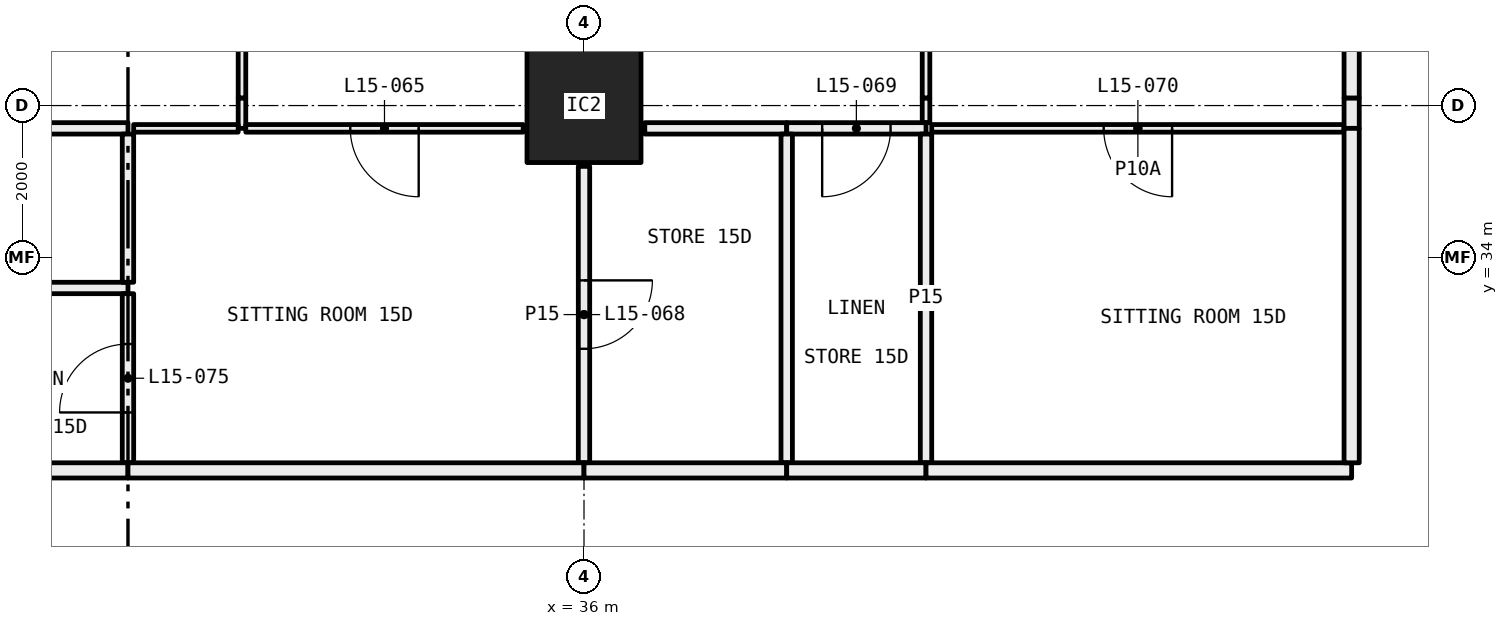
"""IFC4 building model, lengths in metres.
Left out: names, types, materials, properties, quantities, classifications, styles, units other than length and angle.
Written with IfcOpenShell. Run it as: python <this file> out.ifc"""

import sys

from ifc_helpers import new_model, si_unit, direction, frame, frame_2d, origin, origin_2d, place, context, subcontext, project, spatial, rectangle, hollow_rectangle, extrude, element, fill, save


model = new_model("IFC4")
c1 = context("Model", 3, precision=1e-05, world=origin(), true_north=direction((0.0, 1.0)))
c2 = subcontext(c1, "Body", "Model", "MODEL_VIEW")
j1 = project(units=[si_unit("LENGTHUNIT", "METRE"), si_unit("PLANEANGLEUNIT", "RADIAN")], contexts=[c1])
p1 = place(None, origin())
s1 = spatial("IfcSite", under=j1, at=p1, CompositionType="ELEMENT")
p2 = place(p1, origin())
s2 = spatial("IfcBuilding", under=s1, at=p2, CompositionType="ELEMENT")
p3 = place(p2, frame((0.0, 0.0, 64.5)))
s3 = spatial("IfcBuildingStorey", under=s2, at=p3, CompositionType="ELEMENT", Elevation=64.5)
p4 = place(p3, frame((36.0, 36.0, 0.0), z_axis=(0.0, 0.0, 1.0), x_axis=(1.0, 0.0, 0.0)))
e1 = element("IfcColumn", 1, at=p4, inside=s3, PredefinedType="COLUMN", context=c2, shape_type="SweptSolid", body=[
    extrude(hollow_rectangle(XDim=1.5, YDim=1.5, WallThickness=0.065, at=origin_2d()), origin(), (0.0, 0.0, 1.0), 3.05),
])
p5 = place(p3, frame((31.5, 35.7, 0.0), z_axis=(0.0, 0.0, 1.0), x_axis=(0.0, 1.0, 0.0)))
e2 = element("IfcWall", 2, at=p5, inside=s3, PredefinedType="PARTITIONING", context=c2, shape_type="SweptSolid", body=[
    extrude(rectangle(XDim=0.4, YDim=0.1, at=frame_2d((0.2, 0.0))), origin(), (0.0, 0.0, 1.0), 2.45),
])
p6 = place(p3, frame((31.5, 36.1, 0.0), z_axis=(0.0, 0.0, 1.0), x_axis=(0.0, 1.0, 0.0)))
e3 = element("IfcWall", 3, at=p6, inside=s3, PredefinedType="PARTITIONING", context=c2, shape_type="SweptSolid", body=[
    extrude(rectangle(XDim=5.825, YDim=0.1, at=frame_2d((2.913, 0.0))), origin(), (0.0, 0.0, 1.0), 3.05),
])
p7 = place(p6, frame((2.462, 0.0, 0.0)))
e4 = element("IfcOpeningElement", 4, at=p7, cuts=e3, PredefinedType="OPENING", context=c2, shape_type="SweptSolid", body=[
    extrude(rectangle(XDim=0.9, YDim=2.1, at=frame_2d((0.45, 1.05))), frame((0.0, 0.06, 0.0), z_axis=(0.0, -1.0, 0.0), x_axis=(1.0, 0.0, 0.0)), (0.0, 0.0, 1.0), 0.12),
])
p8 = place(p3, frame((26.0, 35.7, 0.0), z_axis=(0.0, 0.0, 1.0), x_axis=(1.0, 0.0, 0.0)))
e5 = element("IfcWall", 5, at=p8, inside=s3, PredefinedType="PARTITIONING", context=c2, shape_type="SweptSolid", body=[
    extrude(rectangle(XDim=4.0, YDim=0.15, at=frame_2d((2.0, 0.0))), origin(), (0.0, 0.0, 1.0), 3.05),
])
p9 = place(p8, frame((1.55, 0.0, 0.0)))
e6 = element("IfcOpeningElement", 6, at=p9, cuts=e5, PredefinedType="OPENING", context=c2, shape_type="SweptSolid", body=[
    extrude(rectangle(XDim=0.9, YDim=2.1, at=frame_2d((0.45, 1.05))), frame((0.0, 0.085, 0.0), z_axis=(0.0, -1.0, 0.0), x_axis=(1.0, 0.0, 0.0)), (0.0, 0.0, 1.0), 0.17),
])
p10 = place(p3, frame((30.075, 35.7, 0.0), z_axis=(0.0, 0.0, 1.0), x_axis=(1.0, 0.0, 0.0)))
e7 = element("IfcWall", 7, at=p10, inside=s3, PredefinedType="PARTITIONING", context=c2, shape_type="SweptSolid", body=[
    extrude(rectangle(XDim=1.375, YDim=0.1, at=frame_2d((0.688, 0.0))), origin(), (0.0, 0.0, 1.0), 3.05),
])
p11 = place(p3, frame((31.55, 35.7, 0.0), z_axis=(0.0, 0.0, 1.0), x_axis=(1.0, 0.0, 0.0)))
e8 = element("IfcWall", 8, at=p11, inside=s3, PredefinedType="PARTITIONING", context=c2, shape_type="SweptSolid", body=[
    extrude(rectangle(XDim=3.65, YDim=0.1, at=frame_2d((1.825, 0.0))), origin(), (0.0, 0.0, 1.0), 3.05),
])
p12 = place(p11, frame((1.375, 0.0, 0.0)))
e9 = element("IfcOpeningElement", 9, at=p12, cuts=e8, PredefinedType="OPENING", context=c2, shape_type="SweptSolid", body=[
    extrude(rectangle(XDim=0.9, YDim=2.1, at=frame_2d((0.45, 1.05))), frame((0.0, 0.06, 0.0), z_axis=(0.0, -1.0, 0.0), x_axis=(1.0, 0.0, 0.0)), (0.0, 0.0, 1.0), 0.12),
])
p13 = place(p3, frame((30.0, 33.6, 0.0), z_axis=(0.0, 0.0, 1.0), x_axis=(-1.0, 0.0, 0.0)))
e10 = element("IfcWall", 10, at=p13, inside=s3, PredefinedType="PARTITIONING", context=c2, shape_type="SweptSolid", body=[
    extrude(rectangle(XDim=1.775, YDim=0.15, at=frame_2d((0.887, 0.0))), origin(), (0.0, 0.0, 1.0), 3.05),
])
p14 = place(p3, frame((30.0, 31.3, 0.0), z_axis=(0.0, 0.0, 1.0), x_axis=(0.0, 1.0, 0.0)))
e11 = element("IfcWall", 11, at=p14, inside=s3, PredefinedType="PARTITIONING", context=c2, shape_type="SweptSolid", body=[
    extrude(rectangle(XDim=2.225, YDim=0.15, at=frame_2d((1.112, 0.0))), origin(), (0.0, 0.0, 1.0), 3.05),
])
p15 = place(p14, frame((0.663, 0.0, 0.0)))
e12 = element("IfcOpeningElement", 12, at=p15, cuts=e11, PredefinedType="OPENING", context=c2, shape_type="SweptSolid", body=[
    extrude(rectangle(XDim=0.9, YDim=2.1, at=frame_2d((0.45, 1.05))), frame((0.0, 0.085, 0.0), z_axis=(0.0, -1.0, 0.0), x_axis=(1.0, 0.0, 0.0)), (0.0, 0.0, 1.0), 0.17),
])
p16 = place(p3, frame((28.15, 31.2, 0.0), z_axis=(0.0, 0.0, 1.0), x_axis=(1.0, 0.0, 0.0)))
e13 = element("IfcWall", 13, at=p16, inside=s3, PredefinedType="PARTITIONING", context=c2, shape_type="SweptSolid", body=[
    extrude(rectangle(XDim=1.85, YDim=0.2, at=frame_2d((0.925, 0.0))), origin(), (0.0, 0.0, 1.0), 3.05),
])
p17 = place(p3, frame((30.0, 33.675, 0.0), z_axis=(0.0, 0.0, 1.0), x_axis=(0.0, 1.0, 0.0)))
e14 = element("IfcWall", 14, at=p17, inside=s3, PredefinedType="PARTITIONING", context=c2, shape_type="SweptSolid", body=[
    extrude(rectangle(XDim=1.95, YDim=0.15, at=frame_2d((0.975, 0.0))), origin(), (0.0, 0.0, 1.0), 3.05),
])
p18 = place(p3, frame((36.0, 31.3, 0.0), z_axis=(0.0, 0.0, 1.0), x_axis=(0.0, 1.0, 0.0)))
e15 = element("IfcWall", 15, at=p18, inside=s3, PredefinedType="PARTITIONING", context=c2, shape_type="SweptSolid", body=[
    extrude(rectangle(XDim=3.9, YDim=0.15, at=frame_2d((1.95, 0.0))), origin(), (0.0, 0.0, 1.0), 2.45),
])
p19 = place(p18, frame((1.5, 0.0, 0.0)))
e16 = element("IfcOpeningElement", 16, at=p19, cuts=e15, PredefinedType="OPENING", context=c2, shape_type="SweptSolid", body=[
    extrude(rectangle(XDim=0.9, YDim=2.1, at=frame_2d((0.45, 1.05))), frame((0.0, 0.085, 0.0), z_axis=(0.0, -1.0, 0.0), x_axis=(1.0, 0.0, 0.0)), (0.0, 0.0, 1.0), 0.17),
])
p20 = place(p3, frame((30.0, 31.2, 0.0), z_axis=(0.0, 0.0, 1.0), x_axis=(1.0, 0.0, 0.0)))
e17 = element("IfcWall", 17, at=p20, inside=s3, PredefinedType="PARTITIONING", context=c2, shape_type="SweptSolid", body=[
    extrude(rectangle(XDim=6.0, YDim=0.2, at=frame_2d((3.0, 0.0))), origin(), (0.0, 0.0, 1.0), 2.45),
])
p21 = place(p3, frame((40.5, 35.775, 0.0), z_axis=(0.0, 0.0, 1.0), x_axis=(0.0, 1.0, 0.0)))
e18 = element("IfcWall", 18, at=p21, inside=s3, PredefinedType="PARTITIONING", context=c2, shape_type="SweptSolid", body=[
    extrude(rectangle(XDim=0.325, YDim=0.1, at=frame_2d((0.163, 0.0))), origin(), (0.0, 0.0, 1.0), 2.45),
])
p22 = place(p3, frame((40.5, 36.1, 0.0), z_axis=(0.0, 0.0, 1.0), x_axis=(0.0, 1.0, 0.0)))
e19 = element("IfcWall", 19, at=p22, inside=s3, PredefinedType="PARTITIONING", context=c2, shape_type="SweptSolid", body=[
    extrude(rectangle(XDim=5.85, YDim=0.1, at=frame_2d((2.925, 0.0))), origin(), (0.0, 0.0, 1.0), 3.05),
])
p23 = place(p22, frame((2.475, 0.0, 0.0)))
e20 = element("IfcOpeningElement", 20, at=p23, cuts=e19, PredefinedType="OPENING", context=c2, shape_type="SweptSolid", body=[
    extrude(rectangle(XDim=0.9, YDim=2.1, at=frame_2d((0.45, 1.05))), frame((0.0, 0.06, 0.0), z_axis=(0.0, -1.0, 0.0), x_axis=(1.0, 0.0, 0.0)), (0.0, 0.0, 1.0), 0.12),
])
p24 = place(p3, frame((36.8, 35.7, 0.0), z_axis=(0.0, 0.0, 1.0), x_axis=(1.0, 0.0, 0.0)))
e21 = element("IfcWall", 21, at=p24, inside=s3, PredefinedType="PARTITIONING", context=c2, shape_type="SweptSolid", body=[
    extrude(rectangle(XDim=1.867, YDim=0.15, at=frame_2d((0.934, 0.0))), origin(), (0.0, 0.0, 1.0), 3.05),
])
p25 = place(p3, frame((38.667, 35.7, 0.0), z_axis=(0.0, 0.0, 1.0), x_axis=(1.0, 0.0, 0.0)))
e22 = element("IfcWall", 22, at=p25, inside=s3, PredefinedType="PARTITIONING", context=c2, shape_type="SweptSolid", body=[
    extrude(rectangle(XDim=1.833, YDim=0.15, at=frame_2d((0.917, 0.0))), origin(), (0.0, 0.0, 1.0), 3.05),
])
p26 = place(p25, frame((0.467, 0.0, 0.0)))
e23 = element("IfcOpeningElement", 23, at=p26, cuts=e22, PredefinedType="OPENING", context=c2, shape_type="SweptSolid", body=[
    extrude(rectangle(XDim=0.9, YDim=2.1, at=frame_2d((0.45, 1.05))), frame((0.0, 0.085, 0.0), z_axis=(0.0, -1.0, 0.0), x_axis=(1.0, 0.0, 0.0)), (0.0, 0.0, 1.0), 0.17),
])
p27 = place(p3, frame((40.575, 35.7, 0.0), z_axis=(0.0, 0.0, 1.0), x_axis=(1.0, 0.0, 0.0)))
e24 = element("IfcWall", 24, at=p27, inside=s3, PredefinedType="PARTITIONING", context=c2, shape_type="SweptSolid", body=[
    extrude(rectangle(XDim=5.425, YDim=0.1, at=frame_2d((2.712, 0.0))), origin(), (0.0, 0.0, 1.0), 3.05),
])
p28 = place(p27, frame((2.262, 0.0, 0.0)))
e25 = element("IfcOpeningElement", 25, at=p28, cuts=e24, PredefinedType="OPENING", context=c2, shape_type="SweptSolid", body=[
    extrude(rectangle(XDim=0.9, YDim=2.1, at=frame_2d((0.45, 1.05))), frame((0.0, 0.06, 0.0), z_axis=(0.0, -1.0, 0.0), x_axis=(1.0, 0.0, 0.0)), (0.0, 0.0, 1.0), 0.12),
])
p29 = place(p3, frame((46.1, 35.7, 0.0), z_axis=(0.0, 0.0, 1.0), x_axis=(0.0, 1.0, 0.0)))
e26 = element("IfcWall", 26, at=p29, inside=s3, PredefinedType="PARTITIONING", context=c2, shape_type="SweptSolid", body=[
    extrude(rectangle(XDim=0.4, YDim=0.2, at=frame_2d((0.2, 0.0))), origin(), (0.0, 0.0, 1.0), 2.45),
])
p30 = place(p3, frame((46.1, 36.1, 0.0), z_axis=(0.0, 0.0, 1.0), x_axis=(0.0, 1.0, 0.0)))
e27 = element("IfcWall", 27, at=p30, inside=s3, PredefinedType="PARTITIONING", context=c2, shape_type="SweptSolid", body=[
    extrude(rectangle(XDim=5.8, YDim=0.2, at=frame_2d((2.9, 0.0))), origin(), (0.0, 0.0, 1.0), 3.05),
])
p31 = place(p3, frame((38.667, 31.3, 0.0), z_axis=(0.0, 0.0, 1.0), x_axis=(0.0, 1.0, 0.0)))
e28 = element("IfcWall", 28, at=p31, inside=s3, PredefinedType="PARTITIONING", context=c2, shape_type="SweptSolid", body=[
    extrude(rectangle(XDim=4.325, YDim=0.15, at=frame_2d((2.163, 0.0))), origin(), (0.0, 0.0, 1.0), 3.05),
])
p32 = place(p3, frame((36.0, 31.2, 0.0), z_axis=(0.0, 0.0, 1.0), x_axis=(1.0, 0.0, 0.0)))
e29 = element("IfcWall", 29, at=p32, inside=s3, PredefinedType="PARTITIONING", context=c2, shape_type="SweptSolid", body=[
    extrude(rectangle(XDim=2.667, YDim=0.2, at=frame_2d((1.333, 0.0))), origin(), (0.0, 0.0, 1.0), 2.45),
])
p33 = place(p3, frame((40.5, 31.3, 0.0), z_axis=(0.0, 0.0, 1.0), x_axis=(0.0, 1.0, 0.0)))
e30 = element("IfcWall", 30, at=p33, inside=s3, PredefinedType="PARTITIONING", context=c2, shape_type="SweptSolid", body=[
    extrude(rectangle(XDim=4.325, YDim=0.15, at=frame_2d((2.163, 0.0))), origin(), (0.0, 0.0, 1.0), 3.05),
])
p34 = place(p3, frame((38.667, 31.2, 0.0), z_axis=(0.0, 0.0, 1.0), x_axis=(1.0, 0.0, 0.0)))
e31 = element("IfcWall", 31, at=p34, inside=s3, PredefinedType="PARTITIONING", context=c2, shape_type="SweptSolid", body=[
    extrude(rectangle(XDim=1.833, YDim=0.2, at=frame_2d((0.917, 0.0))), origin(), (0.0, 0.0, 1.0), 3.05),
])
p35 = place(p3, frame((40.5, 31.2, 0.0), z_axis=(0.0, 0.0, 1.0), x_axis=(1.0, 0.0, 0.0)))
e32 = element("IfcWall", 32, at=p35, inside=s3, PredefinedType="PARTITIONING", context=c2, shape_type="SweptSolid", body=[
    extrude(rectangle(XDim=5.6, YDim=0.2, at=frame_2d((2.8, 0.0))), origin(), (0.0, 0.0, 1.0), 3.05),
])
p36 = place(p3, frame((46.1, 31.3, 0.0), z_axis=(0.0, 0.0, 1.0), x_axis=(0.0, 1.0, 0.0)))
e33 = element("IfcWall", 33, at=p36, inside=s3, PredefinedType="PARTITIONING", context=c2, shape_type="SweptSolid", body=[
    extrude(rectangle(XDim=4.4, YDim=0.2, at=frame_2d((2.2, 0.0))), origin(), (0.0, 0.0, 1.0), 3.05),
])
p37 = place(p12, frame((0.9, 0.0, 0.0), x_axis=(-1.0, 0.0, 0.0)))
e34 = element("IfcDoor", 34, at=p37, inside=s3, OperationType="SINGLE_SWING_RIGHT", PredefinedType="DOOR", context=c2, shape_type="SweptSolid", body=[
    extrude(rectangle(XDim=0.9, YDim=2.1, at=frame_2d((0.45, 1.05))), frame((0.0, 0.025, 0.0), z_axis=(0.0, -1.0, 0.0), x_axis=(1.0, 0.0, 0.0)), (0.0, 0.0, 1.0), 0.05),
])
fill(e9, e34)
p38 = place(p19, frame((0.9, 0.0, 0.0), x_axis=(-1.0, 0.0, 0.0)))
e35 = element("IfcDoor", 35, at=p38, inside=s3, OperationType="SINGLE_SWING_RIGHT", PredefinedType="DOOR", context=c2, shape_type="SweptSolid", body=[
    extrude(rectangle(XDim=0.9, YDim=2.1, at=frame_2d((0.45, 1.05))), frame((0.0, 0.025, 0.0), z_axis=(0.0, -1.0, 0.0), x_axis=(1.0, 0.0, 0.0)), (0.0, 0.0, 1.0), 0.05),
])
fill(e16, e35)
p39 = place(p26, frame((0.9, 0.0, 0.0), x_axis=(-1.0, 0.0, 0.0)))
e36 = element("IfcDoor", 36, at=p39, inside=s3, OperationType="SINGLE_SWING_LEFT", PredefinedType="DOOR", context=c2, shape_type="SweptSolid", body=[
    extrude(rectangle(XDim=0.9, YDim=2.1, at=frame_2d((0.45, 1.05))), frame((0.0, 0.025, 0.0), z_axis=(0.0, -1.0, 0.0), x_axis=(1.0, 0.0, 0.0)), (0.0, 0.0, 1.0), 0.05),
])
fill(e23, e36)
p40 = place(p28, frame((0.9, 0.0, 0.0), x_axis=(-1.0, 0.0, 0.0)))
e37 = element("IfcDoor", 37, at=p40, inside=s3, OperationType="SINGLE_SWING_RIGHT", PredefinedType="DOOR", context=c2, shape_type="SweptSolid", body=[
    extrude(rectangle(XDim=0.9, YDim=2.1, at=frame_2d((0.45, 1.05))), frame((0.0, 0.025, 0.0), z_axis=(0.0, -1.0, 0.0), x_axis=(1.0, 0.0, 0.0)), (0.0, 0.0, 1.0), 0.05),
])
fill(e25, e37)
p41 = place(p15, origin())
e38 = element("IfcDoor", 38, at=p41, inside=s3, OperationType="SINGLE_SWING_RIGHT", PredefinedType="DOOR", context=c2, shape_type="SweptSolid", body=[
    extrude(rectangle(XDim=0.9, YDim=2.1, at=frame_2d((0.45, 1.05))), frame((0.0, 0.025, 0.0), z_axis=(0.0, -1.0, 0.0), x_axis=(1.0, 0.0, 0.0)), (0.0, 0.0, 1.0), 0.05),
])
fill(e12, e38)
save(model, sys.argv[1])
